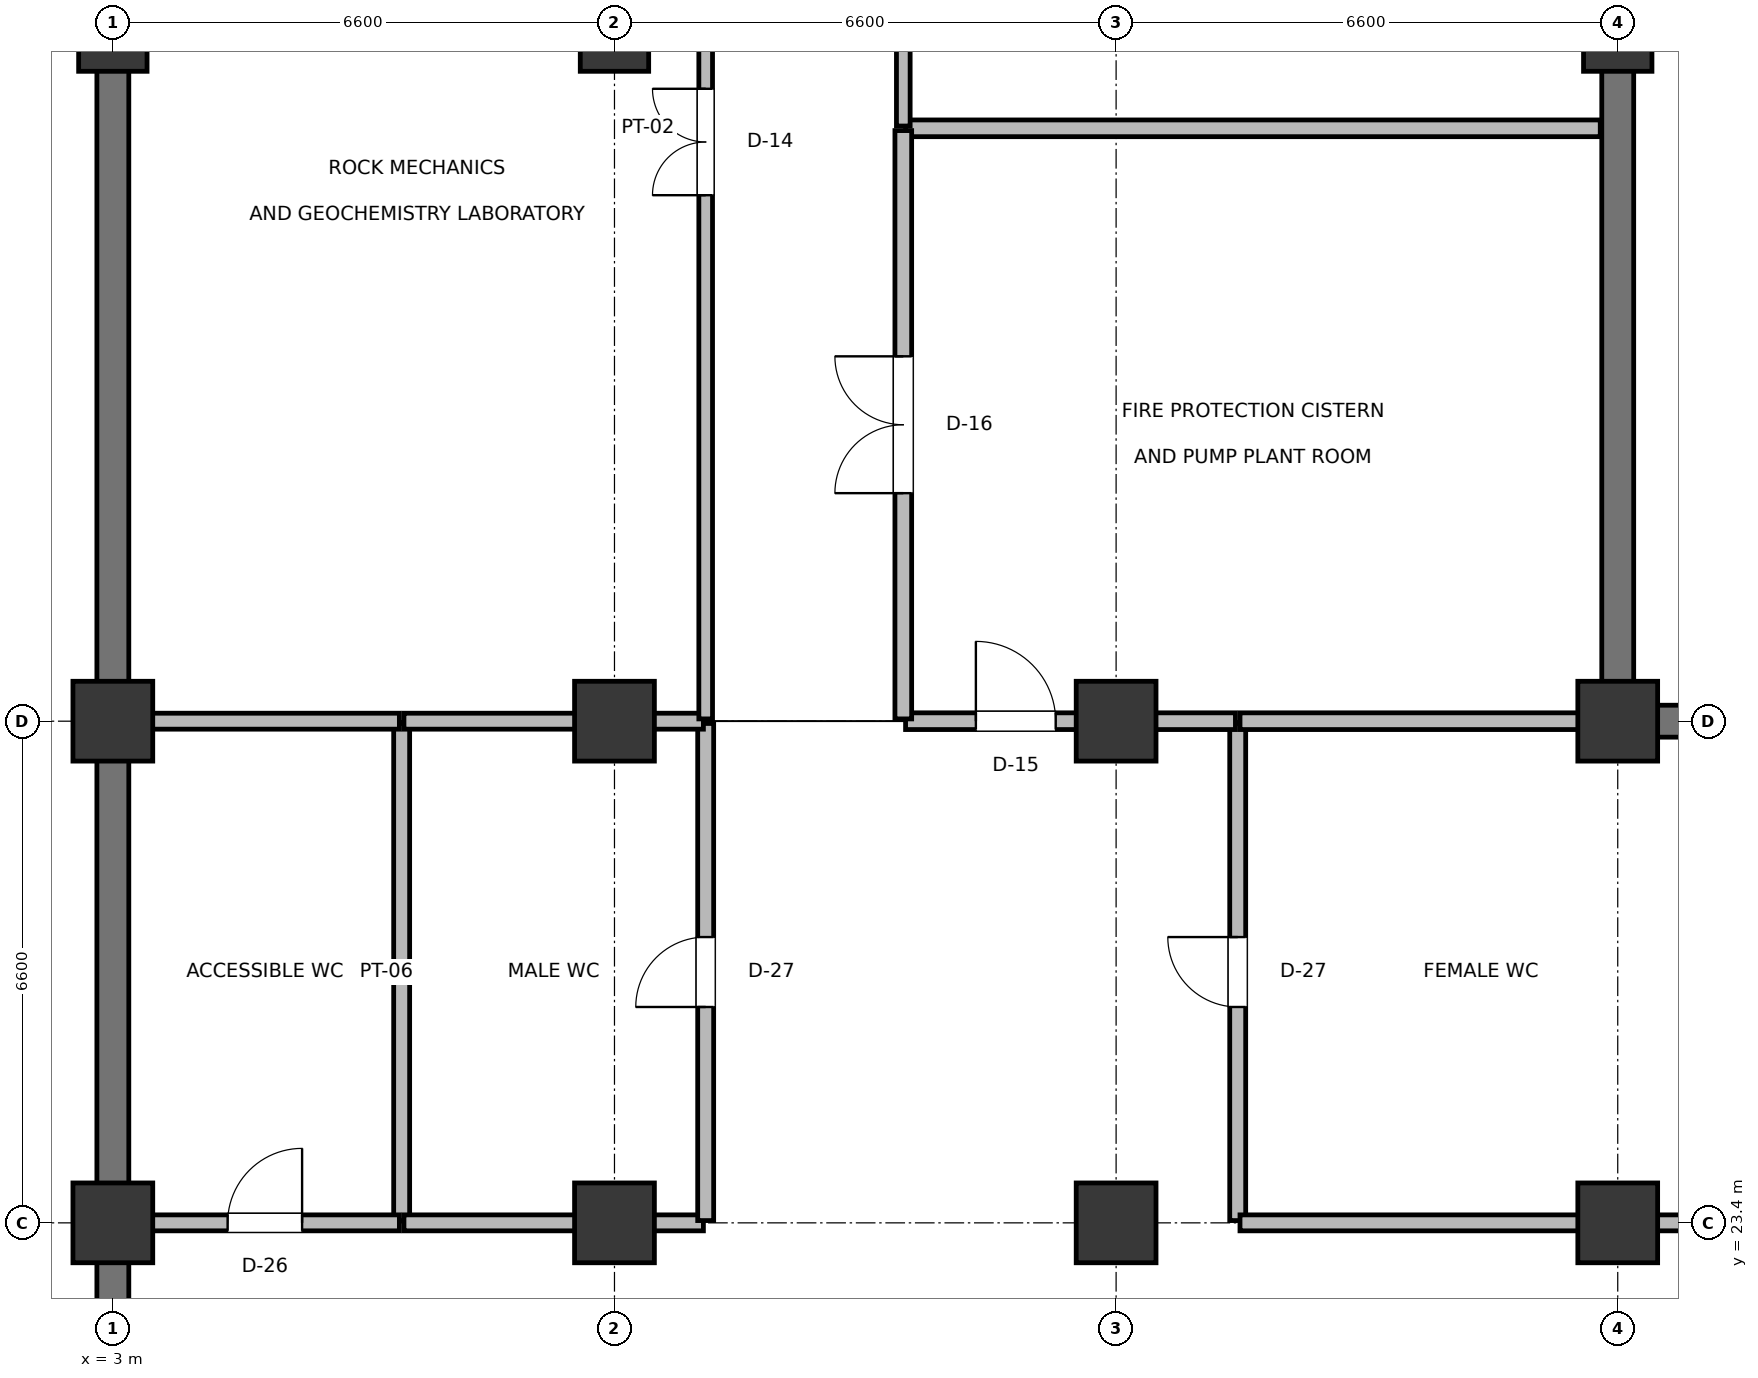
"""IFC4 building model, lengths in metres.
Left out: names, types, materials, properties, quantities, classifications, styles, units other than length and angle.
Written with IfcOpenShell. Run it as: python <this file> out.ifc"""

import sys

from ifc_helpers import new_model, si_unit, direction, frame, frame_2d, origin, origin_2d, place, context, subcontext, project, spatial, rectangle, extrude, element, fill, save


model = new_model("IFC4")
c1 = context("Model", 3, precision=1e-05, world=origin(), true_north=direction((0.0, 1.0)))
c2 = subcontext(c1, "Body", "Model", "MODEL_VIEW")
j1 = project(units=[si_unit("LENGTHUNIT", "METRE"), si_unit("PLANEANGLEUNIT", "RADIAN")], contexts=[c1])
p1 = place(None, origin())
s1 = spatial("IfcSite", under=j1, at=p1, CompositionType="ELEMENT")
p2 = place(p1, origin())
s2 = spatial("IfcBuilding", under=s1, at=p2, CompositionType="ELEMENT")
p3 = place(p2, frame((0.0, 0.0, -4.5)))
s3 = spatial("IfcBuildingStorey", under=s2, at=p3, CompositionType="ELEMENT", Elevation=-4.5)
for number, where, z_axis, x_axis in (
    (1, (3.0, 23.4, 0.0), (0.0, 0.0, 1.0), (1.0, 0.0, 0.0)),
    (2, (3.0, 30.0, 0.0), (0.0, 0.0, 1.0), (1.0, 0.0, 0.0)),
    (3, (9.6, 23.4, 0.0), (0.0, 0.0, 1.0), (1.0, 0.0, 0.0)),
    (4, (9.6, 30.0, 0.0), (0.0, 0.0, 1.0), (1.0, 0.0, 0.0)),
    (5, (16.2, 23.4, 0.0), (0.0, 0.0, 1.0), (1.0, 0.0, 0.0)),
    (6, (16.2, 30.0, 0.0), (0.0, 0.0, 1.0), (1.0, 0.0, 0.0)),
    (7, (22.8, 23.4, 0.0), (0.0, 0.0, 1.0), (1.0, 0.0, 0.0)),
    (8, (22.8, 30.0, 0.0), (0.0, 0.0, 1.0), (1.0, 0.0, 0.0)),
):
    element("IfcColumn", number, at=place(p3, frame(where, z_axis=z_axis, x_axis=x_axis)), inside=s3, PredefinedType="COLUMN", context=c2, shape_type="SweptSolid", body=[
        extrude(rectangle(XDim=1.05, YDim=1.05, at=origin_2d()), origin(), (0.0, 0.0, 1.0), 4.5),
    ])
for number, where, z_axis, x_axis in (
    (9, (3.0, 39.0, 0.0), (0.0, 0.0, 1.0), (1.0, 0.0, 0.0)),
    (10, (9.6, 39.0, 0.0), (0.0, 0.0, 1.0), (1.0, 0.0, 0.0)),
    (11, (22.8, 39.0, 0.0), (0.0, 0.0, 1.0), (1.0, 0.0, 0.0)),
):
    element("IfcColumn", number, at=place(p3, frame(where, z_axis=z_axis, x_axis=x_axis)), inside=s3, PredefinedType="COLUMN", context=c2, shape_type="SweptSolid", body=[
        extrude(rectangle(XDim=0.9, YDim=0.9, at=origin_2d()), origin(), (0.0, 0.0, 1.0), 4.5),
    ])
p4 = place(p3, frame((22.795, 30.0, 0.0), z_axis=(0.0, 0.0, 1.0), x_axis=(1.0, 0.0, 0.0)))
e12 = element("IfcWall", 12, at=p4, inside=s3, PredefinedType="STANDARD", context=c2, shape_type="SweptSolid", body=[
    extrude(rectangle(XDim=13.21, YDim=0.42, at=frame_2d((6.605, 0.0))), origin(), (0.0, 0.0, 1.0), 3.45),
])
p5 = place(p3, frame((22.8, 29.995, 0.0), z_axis=(0.0, 0.0, 1.0), x_axis=(0.0, 1.0, 0.0)))
e13 = element("IfcWall", 13, at=p5, inside=s3, PredefinedType="STANDARD", context=c2, shape_type="SweptSolid", body=[
    extrude(rectangle(XDim=70.21, YDim=0.42, at=frame_2d((35.105, 0.0))), origin(), (0.0, 0.0, 1.0), 3.45),
])
p6 = place(p3, frame((3.0, 2.995, 0.0), z_axis=(0.0, 0.0, 1.0), x_axis=(0.0, 1.0, 0.0)))
e14 = element("IfcWall", 14, at=p6, inside=s3, PredefinedType="STANDARD", context=c2, shape_type="SweptSolid", body=[
    extrude(rectangle(XDim=114.01, YDim=0.42, at=frame_2d((57.005, 0.0))), origin(), (0.0, 0.0, 1.0), 3.45),
])
p7 = place(p3, frame((6.8, 23.43, 0.0), z_axis=(0.0, 0.0, 1.0), x_axis=(0.0, 1.0, 0.0)))
e15 = element("IfcWall", 15, at=p7, inside=s3, PredefinedType="PLUMBINGWALL", context=c2, shape_type="SweptSolid", body=[
    extrude(rectangle(XDim=6.54, YDim=0.21, at=frame_2d((3.27, 0.0))), origin(), (0.0, 0.0, 1.0), 3.425),
])
p8 = place(p3, frame((3.23, 23.4, 0.0), z_axis=(0.0, 0.0, 1.0), x_axis=(1.0, 0.0, 0.0)))
e16 = element("IfcWall", 16, at=p8, inside=s3, PredefinedType="PLUMBINGWALL", context=c2, shape_type="SweptSolid", body=[
    extrude(rectangle(XDim=3.54, YDim=0.21, at=frame_2d((1.77, 0.0))), origin(), (0.0, 0.0, 1.0), 3.755),
])
p9 = place(p8, frame((1.28, 0.0, 0.0)))
e17 = element("IfcOpeningElement", 17, at=p9, cuts=e16, PredefinedType="OPENING", context=c2, shape_type="SweptSolid", body=[
    extrude(rectangle(XDim=0.98, YDim=2.1, at=frame_2d((0.49, 1.05))), frame((0.0, 0.115, 0.0), z_axis=(0.0, -1.0, 0.0), x_axis=(1.0, 0.0, 0.0)), (0.0, 0.0, 1.0), 0.23),
])
p10 = place(p3, frame((3.23, 30.0, 0.0), z_axis=(0.0, 0.0, 1.0), x_axis=(1.0, 0.0, 0.0)))
e18 = element("IfcWall", 18, at=p10, inside=s3, PredefinedType="PLUMBINGWALL", context=c2, shape_type="SweptSolid", body=[
    extrude(rectangle(XDim=3.54, YDim=0.21, at=frame_2d((1.77, 0.0))), origin(), (0.0, 0.0, 1.0), 3.425),
])
p11 = place(p3, frame((6.83, 23.4, 0.0), z_axis=(0.0, 0.0, 1.0), x_axis=(1.0, 0.0, 0.0)))
e19 = element("IfcWall", 19, at=p11, inside=s3, PredefinedType="PLUMBINGWALL", context=c2, shape_type="SweptSolid", body=[
    extrude(rectangle(XDim=3.94, YDim=0.21, at=frame_2d((1.97, 0.0))), origin(), (0.0, 0.0, 1.0), 3.525),
])
p12 = place(p3, frame((10.8, 23.43, 0.0), z_axis=(0.0, 0.0, 1.0), x_axis=(0.0, 1.0, 0.0)))
e20 = element("IfcWall", 20, at=p12, inside=s3, PredefinedType="PLUMBINGWALL", context=c2, shape_type="SweptSolid", body=[
    extrude(rectangle(XDim=6.54, YDim=0.21, at=frame_2d((3.27, 0.0))), origin(), (0.0, 0.0, 1.0), 3.435),
])
p13 = place(p12, frame((2.81, 0.0, 0.0)))
e21 = element("IfcOpeningElement", 21, at=p13, cuts=e20, PredefinedType="OPENING", context=c2, shape_type="SweptSolid", body=[
    extrude(rectangle(XDim=0.92, YDim=2.1, at=frame_2d((0.46, 1.05))), frame((0.0, 0.115, 0.0), z_axis=(0.0, -1.0, 0.0), x_axis=(1.0, 0.0, 0.0)), (0.0, 0.0, 1.0), 0.23),
])
p14 = place(p3, frame((6.83, 30.0, 0.0), z_axis=(0.0, 0.0, 1.0), x_axis=(1.0, 0.0, 0.0)))
e22 = element("IfcWall", 22, at=p14, inside=s3, PredefinedType="PLUMBINGWALL", context=c2, shape_type="SweptSolid", body=[
    extrude(rectangle(XDim=3.94, YDim=0.21, at=frame_2d((1.97, 0.0))), origin(), (0.0, 0.0, 1.0), 3.425),
])
p15 = place(p3, frame((17.8, 23.43, 0.0), z_axis=(0.0, 0.0, 1.0), x_axis=(0.0, 1.0, 0.0)))
e23 = element("IfcWall", 23, at=p15, inside=s3, PredefinedType="PLUMBINGWALL", context=c2, shape_type="SweptSolid", body=[
    extrude(rectangle(XDim=6.54, YDim=0.21, at=frame_2d((3.27, 0.0))), origin(), (0.0, 0.0, 1.0), 3.425),
])
p16 = place(p15, frame((2.81, 0.0, 0.0)))
e24 = element("IfcOpeningElement", 24, at=p16, cuts=e23, PredefinedType="OPENING", context=c2, shape_type="SweptSolid", body=[
    extrude(rectangle(XDim=0.92, YDim=2.1, at=frame_2d((0.46, 1.05))), frame((0.0, 0.115, 0.0), z_axis=(0.0, -1.0, 0.0), x_axis=(1.0, 0.0, 0.0)), (0.0, 0.0, 1.0), 0.23),
])
p17 = place(p3, frame((17.83, 23.4, 0.0), z_axis=(0.0, 0.0, 1.0), x_axis=(1.0, 0.0, 0.0)))
e25 = element("IfcWall", 25, at=p17, inside=s3, PredefinedType="PLUMBINGWALL", context=c2, shape_type="SweptSolid", body=[
    extrude(rectangle(XDim=6.14, YDim=0.21, at=frame_2d((3.07, 0.0))), origin(), (0.0, 0.0, 1.0), 3.525),
])
p18 = place(p3, frame((17.83, 30.0, 0.0), z_axis=(0.0, 0.0, 1.0), x_axis=(1.0, 0.0, 0.0)))
e26 = element("IfcWall", 26, at=p18, inside=s3, PredefinedType="PARTITIONING", context=c2, shape_type="SweptSolid", body=[
    extrude(rectangle(XDim=4.74, YDim=0.22, at=frame_2d((2.37, 0.0))), origin(), (0.0, 0.0, 1.0), 3.425),
])
p19 = place(p3, frame((13.43, 30.0, 0.0), z_axis=(0.0, 0.0, 1.0), x_axis=(1.0, 0.0, 0.0)))
e27 = element("IfcWall", 27, at=p19, inside=s3, PredefinedType="PARTITIONING", context=c2, shape_type="SweptSolid", body=[
    extrude(rectangle(XDim=4.34, YDim=0.22, at=frame_2d((2.17, 0.0))), origin(), (0.0, 0.0, 1.0), 3.425),
])
p20 = place(p19, frame((0.925, 0.0, 0.0)))
e28 = element("IfcOpeningElement", 28, at=p20, cuts=e27, PredefinedType="OPENING", context=c2, shape_type="SweptSolid", body=[
    extrude(rectangle(XDim=1.05, YDim=2.2, at=frame_2d((0.525, 1.1))), frame((0.0, 0.12, 0.0), z_axis=(0.0, -1.0, 0.0), x_axis=(1.0, 0.0, 0.0)), (0.0, 0.0, 1.0), 0.24),
])
p21 = place(p3, frame((10.8, 30.03, 0.0), z_axis=(0.0, 0.0, 1.0), x_axis=(0.0, 1.0, 0.0)))
e29 = element("IfcWall", 29, at=p21, inside=s3, PredefinedType="PARTITIONING", context=c2, shape_type="SweptSolid", body=[
    extrude(rectangle(XDim=15.54, YDim=0.18, at=frame_2d((7.77, 0.0))), origin(), (0.0, 0.0, 1.0), 3.295),
])
p22 = place(p21, frame((6.89, 0.0, 0.0)))
e30 = element("IfcOpeningElement", 30, at=p22, cuts=e29, PredefinedType="OPENING", context=c2, shape_type="SweptSolid", body=[
    extrude(rectangle(XDim=1.4, YDim=2.2, at=frame_2d((0.7, 1.1))), frame((0.0, 0.1, 0.0), z_axis=(0.0, -1.0, 0.0), x_axis=(1.0, 0.0, 0.0)), (0.0, 0.0, 1.0), 0.2),
])
p23 = place(p3, frame((13.43, 37.8, 0.0), z_axis=(0.0, 0.0, 1.0), x_axis=(1.0, 0.0, 0.0)))
e31 = element("IfcWall", 31, at=p23, inside=s3, PredefinedType="PARTITIONING", context=c2, shape_type="SweptSolid", body=[
    extrude(rectangle(XDim=9.14, YDim=0.22, at=frame_2d((4.57, 0.0))), origin(), (0.0, 0.0, 1.0), 3.525),
])
p24 = place(p3, frame((13.4, 30.03, 0.0), z_axis=(0.0, 0.0, 1.0), x_axis=(0.0, 1.0, 0.0)))
e32 = element("IfcWall", 32, at=p24, inside=s3, PredefinedType="PARTITIONING", context=c2, shape_type="SweptSolid", body=[
    extrude(rectangle(XDim=7.74, YDim=0.22, at=frame_2d((3.87, 0.0))), origin(), (0.0, 0.0, 1.0), 3.435),
])
p25 = place(p24, frame((2.97, 0.0, 0.0)))
e33 = element("IfcOpeningElement", 33, at=p25, cuts=e32, PredefinedType="OPENING", context=c2, shape_type="SweptSolid", body=[
    extrude(rectangle(XDim=1.8, YDim=2.4, at=frame_2d((0.9, 1.2))), frame((0.0, 0.12, 0.0), z_axis=(0.0, -1.0, 0.0), x_axis=(1.0, 0.0, 0.0)), (0.0, 0.0, 1.0), 0.24),
])
p26 = place(p3, frame((13.4, 37.83, 0.0), z_axis=(0.0, 0.0, 1.0), x_axis=(0.0, 1.0, 0.0)))
e34 = element("IfcWall", 34, at=p26, inside=s3, PredefinedType="PARTITIONING", context=c2, shape_type="SweptSolid", body=[
    extrude(rectangle(XDim=7.74, YDim=0.18, at=frame_2d((3.87, 0.0))), origin(), (0.0, 0.0, 1.0), 3.295),
])
p27 = place(p26, frame((3.17, 0.0, 0.0)))
e35 = element("IfcOpeningElement", 35, at=p27, cuts=e34, PredefinedType="OPENING", context=c2, shape_type="SweptSolid", body=[
    extrude(rectangle(XDim=1.4, YDim=2.2, at=frame_2d((0.7, 1.1))), frame((0.0, 0.1, 0.0), z_axis=(0.0, -1.0, 0.0), x_axis=(1.0, 0.0, 0.0)), (0.0, 0.0, 1.0), 0.2),
])
p28 = place(p9, origin())
e36 = element("IfcDoor", 36, at=p28, inside=s3, OperationType="SINGLE_SWING_RIGHT", PredefinedType="DOOR", context=c2, shape_type="SweptSolid", body=[
    extrude(rectangle(XDim=0.98, YDim=2.1, at=frame_2d((0.49, 1.05))), frame((0.0, 0.025, 0.0), z_axis=(0.0, -1.0, 0.0), x_axis=(1.0, 0.0, 0.0)), (0.0, 0.0, 1.0), 0.05),
])
fill(e17, e36)
p29 = place(p13, origin())
e37 = element("IfcDoor", 37, at=p29, inside=s3, OperationType="SINGLE_SWING_LEFT", PredefinedType="DOOR", context=c2, shape_type="SweptSolid", body=[
    extrude(rectangle(XDim=0.92, YDim=2.1, at=frame_2d((0.46, 1.05))), frame((0.0, 0.025, 0.0), z_axis=(0.0, -1.0, 0.0), x_axis=(1.0, 0.0, 0.0)), (0.0, 0.0, 1.0), 0.05),
])
fill(e21, e37)
p30 = place(p16, origin())
e38 = element("IfcDoor", 38, at=p30, inside=s3, OperationType="SINGLE_SWING_RIGHT", PredefinedType="DOOR", context=c2, shape_type="SweptSolid", body=[
    extrude(rectangle(XDim=0.92, YDim=2.1, at=frame_2d((0.46, 1.05))), frame((0.0, 0.025, 0.0), z_axis=(0.0, -1.0, 0.0), x_axis=(1.0, 0.0, 0.0)), (0.0, 0.0, 1.0), 0.05),
])
fill(e24, e38)
p31 = place(p20, origin())
e39 = element("IfcDoor", 39, at=p31, inside=s3, OperationType="SINGLE_SWING_LEFT", PredefinedType="DOOR", context=c2, shape_type="SweptSolid", body=[
    extrude(rectangle(XDim=1.05, YDim=2.2, at=frame_2d((0.525, 1.1))), frame((0.0, 0.025, 0.0), z_axis=(0.0, -1.0, 0.0), x_axis=(1.0, 0.0, 0.0)), (0.0, 0.0, 1.0), 0.05),
])
fill(e28, e39)
p32 = place(p22, origin())
e40 = element("IfcDoor", 40, at=p32, inside=s3, OperationType="DOUBLE_DOOR_SINGLE_SWING", PredefinedType="DOOR", context=c2, shape_type="SweptSolid", body=[
    extrude(rectangle(XDim=1.4, YDim=2.2, at=frame_2d((0.7, 1.1))), frame((0.0, 0.025, 0.0), z_axis=(0.0, -1.0, 0.0), x_axis=(1.0, 0.0, 0.0)), (0.0, 0.0, 1.0), 0.05),
])
fill(e30, e40)
p33 = place(p25, origin())
e41 = element("IfcDoor", 41, at=p33, inside=s3, OperationType="DOUBLE_DOOR_SINGLE_SWING", PredefinedType="DOOR", context=c2, shape_type="SweptSolid", body=[
    extrude(rectangle(XDim=1.8, YDim=2.4, at=frame_2d((0.9, 1.2))), frame((0.0, 0.025, 0.0), z_axis=(0.0, -1.0, 0.0), x_axis=(1.0, 0.0, 0.0)), (0.0, 0.0, 1.0), 0.05),
])
fill(e33, e41)
save(model, sys.argv[1])
